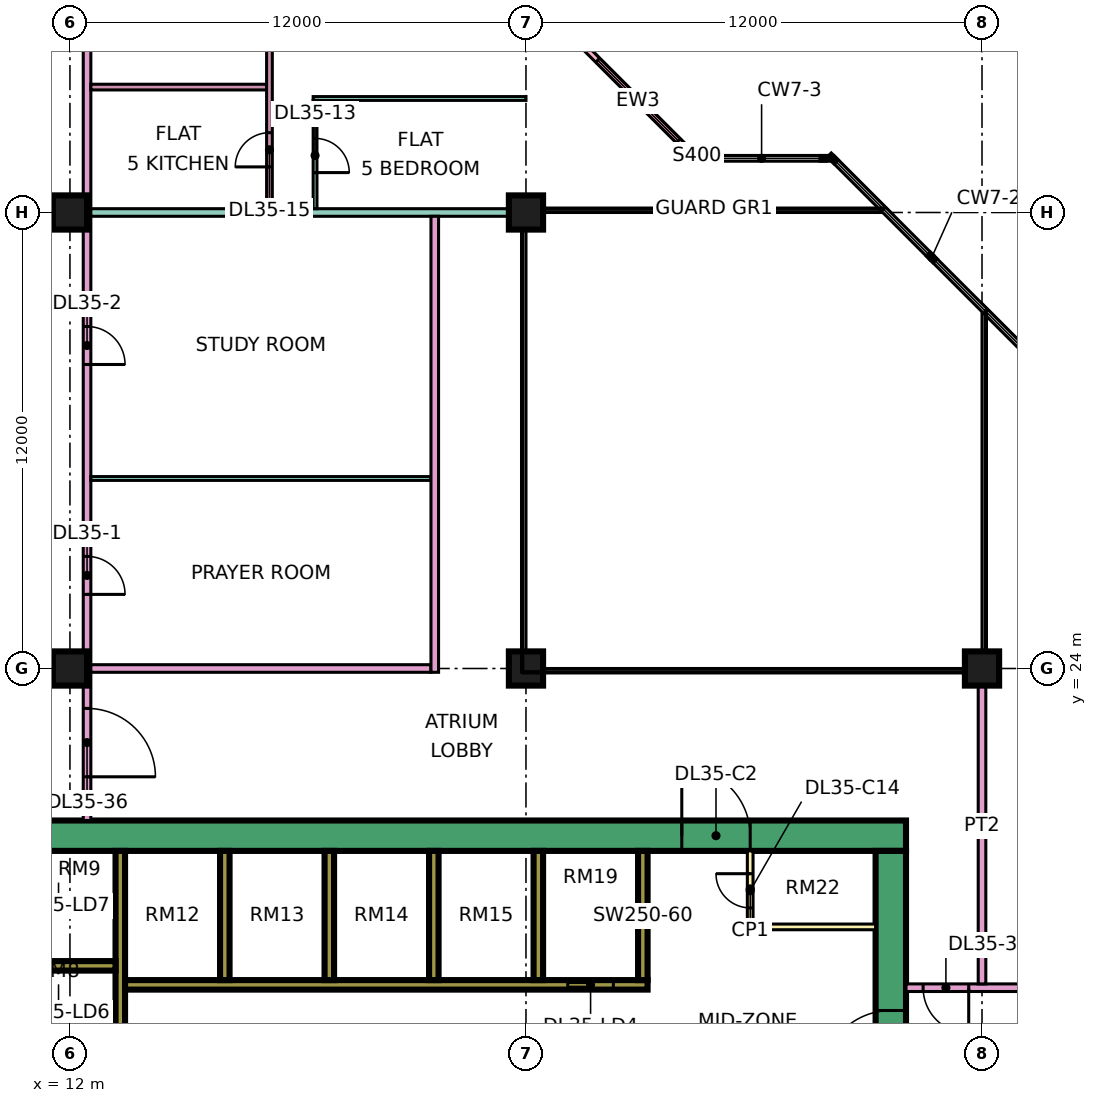
"""IFC4 building model, lengths in metres.
Left out: names, types, materials, properties, quantities, classifications, styles, units other than length and angle.
Written with IfcOpenShell. Run it as: python <this file> out.ifc"""

import sys

from ifc_helpers import new_model, si_unit, direction, frame, frame_2d, origin, origin_2d, place, context, subcontext, project, spatial, rectangle, extrude, element, fill, save


model = new_model("IFC4")
c1 = context("Model", 3, precision=1e-05, world=origin(), true_north=direction((0.0, 1.0)))
c2 = subcontext(c1, "Body", "Model", "MODEL_VIEW")
j1 = project(units=[si_unit("LENGTHUNIT", "METRE"), si_unit("PLANEANGLEUNIT", "RADIAN")], contexts=[c1])
p1 = place(None, origin())
s1 = spatial("IfcSite", under=j1, at=p1, CompositionType="ELEMENT")
p2 = place(p1, origin())
s2 = spatial("IfcBuilding", under=s1, at=p2, CompositionType="ELEMENT")
p3 = place(p2, frame((0.0, 0.0, 157.4)))
s3 = spatial("IfcBuildingStorey", under=s2, at=p3, CompositionType="ELEMENT", Elevation=157.4)
for number, where, z_axis, x_axis in (
    (1, (12.0, 24.0, 0.0), (0.0, 0.0, 1.0), (1.0, 0.0, 0.0)),
    (2, (12.0, 36.0, 0.0), (0.0, 0.0, 1.0), (1.0, 0.0, 0.0)),
    (3, (24.0, 24.0, 0.0), (0.0, 0.0, 1.0), (1.0, 0.0, 0.0)),
    (4, (24.0, 36.0, 0.0), (0.0, 0.0, 1.0), (1.0, 0.0, 0.0)),
    (5, (36.0, 24.0, 0.0), (0.0, 0.0, 1.0), (1.0, 0.0, 0.0)),
):
    element("IfcColumn", number, at=place(p3, frame(where, z_axis=z_axis, x_axis=x_axis)), inside=s3, PredefinedType="COLUMN", context=c2, shape_type="SweptSolid", body=[
        extrude(rectangle(XDim=0.9, YDim=0.9, at=origin_2d()), origin(), (0.0, 0.0, 1.0), 3.75),
    ])
p4 = place(p3, frame((9.0, 19.6, 0.0), z_axis=(0.0, 0.0, 1.0), x_axis=(1.0, 0.0, 0.0)))
e6 = element("IfcWall", 6, at=p4, inside=s3, PredefinedType="SHEAR", context=c2, shape_type="SweptSolid", body=[
    extrude(rectangle(XDim=25.0, YDim=0.8, at=frame_2d((12.5, 0.0))), origin(), (0.0, 0.0, 1.0), 3.75),
])
p5 = place(p4, frame((19.1, 0.0, 0.0)))
e7 = element("IfcOpeningElement", 7, at=p5, cuts=e6, PredefinedType="OPENING", context=c2, shape_type="SweptSolid", body=[
    extrude(rectangle(XDim=1.8, YDim=2.4, at=frame_2d((0.9, 1.2))), frame((0.0, 0.41, 0.0), z_axis=(0.0, -1.0, 0.0), x_axis=(1.0, 0.0, 0.0)), (0.0, 0.0, 1.0), 0.82),
])
p6 = place(p3, frame((33.6, 7.8, 0.0), z_axis=(0.0, 0.0, 1.0), x_axis=(0.0, 1.0, 0.0)))
e8 = element("IfcWall", 8, at=p6, inside=s3, PredefinedType="SHEAR", context=c2, shape_type="SweptSolid", body=[
    extrude(rectangle(XDim=11.4, YDim=0.8, at=frame_2d((5.7, 0.0))), origin(), (0.0, 0.0, 1.0), 3.75),
])
p7 = place(p6, frame((5.4, 0.0, 0.0)))
e9 = element("IfcOpeningElement", 9, at=p7, cuts=e8, PredefinedType="OPENING", context=c2, shape_type="SweptSolid", body=[
    extrude(rectangle(XDim=1.8, YDim=2.4, at=frame_2d((0.9, 1.2))), frame((0.0, 0.41, 0.0), z_axis=(0.0, -1.0, 0.0), x_axis=(1.0, 0.0, 0.0)), (0.0, 0.0, 1.0), 0.82),
])
p8 = place(p3, frame((13.325, 7.8, 0.0), z_axis=(0.0, 0.0, 1.0), x_axis=(0.0, 1.0, 0.0)))
e10 = element("IfcWall", 10, at=p8, inside=s3, PredefinedType="SHEAR", context=c2, shape_type="SweptSolid", body=[
    extrude(rectangle(XDim=11.4, YDim=0.25, at=frame_2d((5.7, 0.0))), origin(), (0.0, 0.0, 1.0), 3.75),
])
p9 = place(p3, frame((13.45, 15.675, 0.0), z_axis=(0.0, 0.0, 1.0), x_axis=(1.0, 0.0, 0.0)))
e11 = element("IfcWall", 11, at=p9, inside=s3, PredefinedType="SHEAR", context=c2, shape_type="SweptSolid", body=[
    extrude(rectangle(XDim=13.75, YDim=0.25, at=frame_2d((6.875, 0.0))), origin(), (0.0, 0.0, 1.0), 3.75),
])
p10 = place(p9, frame((11.65, 0.0, 0.0)))
e12 = element("IfcOpeningElement", 12, at=p10, cuts=e11, PredefinedType="OPENING", context=c2, shape_type="SweptSolid", body=[
    extrude(rectangle(XDim=1.2, YDim=2.2, at=frame_2d((0.6, 1.1))), frame((0.0, 0.135, 0.0), z_axis=(0.0, -1.0, 0.0), x_axis=(1.0, 0.0, 0.0)), (0.0, 0.0, 1.0), 0.27),
])
p11 = place(p3, frame((10.2, 16.175, 0.0), z_axis=(0.0, 0.0, 1.0), x_axis=(1.0, 0.0, 0.0)))
e13 = element("IfcWall", 13, at=p11, inside=s3, PredefinedType="SHEAR", context=c2, shape_type="SweptSolid", body=[
    extrude(rectangle(XDim=3.0, YDim=0.25, at=frame_2d((1.5, 0.0))), origin(), (0.0, 0.0, 1.0), 3.75),
])
for number, where, z_axis, x_axis in (
    (14, (16.075, 15.8, 0.0), (0.0, 0.0, 1.0), (0.0, 1.0, 0.0)),
    (15, (18.825, 15.8, 0.0), (0.0, 0.0, 1.0), (0.0, 1.0, 0.0)),
    (16, (21.575, 15.8, 0.0), (0.0, 0.0, 1.0), (0.0, 1.0, 0.0)),
    (17, (24.325, 15.8, 0.0), (0.0, 0.0, 1.0), (0.0, 1.0, 0.0)),
    (18, (27.075, 15.8, 0.0), (0.0, 0.0, 1.0), (0.0, 1.0, 0.0)),
):
    element("IfcWall", number, at=place(p3, frame(where, z_axis=z_axis, x_axis=x_axis)), inside=s3, PredefinedType="SHEAR", context=c2, shape_type="SweptSolid", body=[
        extrude(rectangle(XDim=3.4, YDim=0.25, at=frame_2d((1.7, 0.0))), origin(), (0.0, 0.0, 1.0), 3.75),
    ])
p12 = place(p3, frame((28.447, 37.447, 0.0), z_axis=(0.0, 0.0, 1.0), x_axis=(-0.707106781187, 0.707106781187, 0.0)))
e19 = element("IfcWall", 19, at=p12, inside=s3, PredefinedType="SOLIDWALL", context=c2, shape_type="SweptSolid", body=[
    extrude(rectangle(XDim=4.243, YDim=0.15, at=frame_2d((2.121, 0.0))), origin(), (0.0, 0.0, 1.0), 3.35),
])
p13 = place(p12, frame((0.621, 0.0, 0.45)))
e20 = element("IfcOpeningElement", 20, at=p13, cuts=e19, PredefinedType="OPENING", context=c2, shape_type="SweptSolid", body=[
    extrude(rectangle(XDim=3.0, YDim=2.4, at=frame_2d((1.5, 1.2))), frame((0.0, 0.085, 0.0), z_axis=(0.0, -1.0, 0.0), x_axis=(1.0, 0.0, 0.0)), (0.0, 0.0, 1.0), 0.17),
])
p14 = place(p3, frame((29.9, 17.2, 0.0), z_axis=(0.0, 0.0, 1.0), x_axis=(0.0, 1.0, 0.0)))
e21 = element("IfcWall", 21, at=p14, inside=s3, PredefinedType="PARTITIONING", context=c2, shape_type="SweptSolid", body=[
    extrude(rectangle(XDim=2.0, YDim=0.15, at=frame_2d((1.0, 0.0))), origin(), (0.0, 0.0, 1.0), 3.35),
])
p15 = place(p14, frame((0.5, 0.0, 0.0)))
e22 = element("IfcOpeningElement", 22, at=p15, cuts=e21, PredefinedType="OPENING", context=c2, shape_type="SweptSolid", body=[
    extrude(rectangle(XDim=0.9, YDim=2.1, at=frame_2d((0.45, 1.05))), frame((0.0, 0.085, 0.0), z_axis=(0.0, -1.0, 0.0), x_axis=(1.0, 0.0, 0.0)), (0.0, 0.0, 1.0), 0.17),
])
p16 = place(p3, frame((29.9, 17.2, 0.0), z_axis=(0.0, 0.0, 1.0), x_axis=(1.0, 0.0, 0.0)))
e23 = element("IfcWall", 23, at=p16, inside=s3, PredefinedType="PARTITIONING", context=c2, shape_type="SweptSolid", body=[
    extrude(rectangle(XDim=3.3, YDim=0.15, at=frame_2d((1.65, 0.0))), origin(), (0.0, 0.0, 1.0), 3.35),
])
p17 = place(p3, frame((12.45, 20.0, 0.0), z_axis=(0.0, 0.0, 1.0), x_axis=(0.0, 1.0, 0.0)))
e24 = element("IfcWall", 24, at=p17, inside=s3, PredefinedType="PARTITIONING", context=c2, shape_type="SweptSolid", body=[
    extrude(rectangle(XDim=43.0, YDim=0.2, at=frame_2d((21.5, 0.0))), origin(), (0.0, 0.0, 1.0), 3.35),
])
p18 = place(p17, frame((5.95, 0.0, 0.0)))
e25 = element("IfcOpeningElement", 25, at=p18, cuts=e24, PredefinedType="OPENING", context=c2, shape_type="SweptSolid", body=[
    extrude(rectangle(XDim=1.0, YDim=2.1, at=frame_2d((0.5, 1.05))), frame((0.0, 0.11, 0.0), z_axis=(0.0, -1.0, 0.0), x_axis=(1.0, 0.0, 0.0)), (0.0, 0.0, 1.0), 0.22),
])
p19 = place(p17, frame((12.0, 0.0, 0.0)))
e26 = element("IfcOpeningElement", 26, at=p19, cuts=e24, PredefinedType="OPENING", context=c2, shape_type="SweptSolid", body=[
    extrude(rectangle(XDim=1.0, YDim=2.1, at=frame_2d((0.5, 1.05))), frame((0.0, 0.11, 0.0), z_axis=(0.0, -1.0, 0.0), x_axis=(1.0, 0.0, 0.0)), (0.0, 0.0, 1.0), 0.22),
])
p20 = place(p17, frame((23.35, 0.0, 0.0)))
e27 = element("IfcOpeningElement", 27, at=p20, cuts=e24, PredefinedType="OPENING", context=c2, shape_type="SweptSolid", body=[
    extrude(rectangle(XDim=1.0, YDim=2.1, at=frame_2d((0.5, 1.05))), frame((0.0, 0.11, 0.0), z_axis=(0.0, -1.0, 0.0), x_axis=(1.0, 0.0, 0.0)), (0.0, 0.0, 1.0), 0.22),
])
p21 = place(p17, frame((35.2, 0.0, 0.0)))
e28 = element("IfcOpeningElement", 28, at=p21, cuts=e24, PredefinedType="OPENING", context=c2, shape_type="SweptSolid", body=[
    extrude(rectangle(XDim=1.0, YDim=2.1, at=frame_2d((0.5, 1.05))), frame((0.0, 0.11, 0.0), z_axis=(0.0, -1.0, 0.0), x_axis=(1.0, 0.0, 0.0)), (0.0, 0.0, 1.0), 0.22),
])
p22 = place(p17, frame((1.15, 0.0, 0.0)))
e29 = element("IfcOpeningElement", 29, at=p22, cuts=e24, PredefinedType="OPENING", context=c2, shape_type="SweptSolid", body=[
    extrude(rectangle(XDim=1.8, YDim=2.1, at=frame_2d((0.9, 1.05))), frame((0.0, 0.11, 0.0), z_axis=(0.0, -1.0, 0.0), x_axis=(1.0, 0.0, 0.0)), (0.0, 0.0, 1.0), 0.22),
])
p23 = place(p17, frame((28.6, 0.0, 0.0)))
e30 = element("IfcOpeningElement", 30, at=p23, cuts=e24, PredefinedType="OPENING", context=c2, shape_type="SweptSolid", body=[
    extrude(rectangle(XDim=1.8, YDim=2.1, at=frame_2d((0.9, 1.05))), frame((0.0, 0.11, 0.0), z_axis=(0.0, -1.0, 0.0), x_axis=(1.0, 0.0, 0.0)), (0.0, 0.0, 1.0), 0.22),
])
p24 = place(p3, frame((12.55, 24.0, 0.0), z_axis=(0.0, 0.0, 1.0), x_axis=(1.0, 0.0, 0.0)))
e31 = element("IfcWall", 31, at=p24, inside=s3, PredefinedType="PARTITIONING", context=c2, shape_type="SweptSolid", body=[
    extrude(rectangle(XDim=8.95, YDim=0.2, at=frame_2d((4.475, 0.0))), origin(), (0.0, 0.0, 1.0), 3.35),
])
p25 = place(p3, frame((12.55, 29.0, 0.0), z_axis=(0.0, 0.0, 1.0), x_axis=(1.0, 0.0, 0.0)))
e32 = element("IfcWall", 32, at=p25, inside=s3, PredefinedType="PARTITIONING", context=c2, shape_type="SweptSolid", body=[
    extrude(rectangle(XDim=8.95, YDim=0.1, at=frame_2d((4.475, 0.0))), origin(), (0.0, 0.0, 1.0), 3.35),
])
p26 = place(p3, frame((12.55, 36.0, 0.0), z_axis=(0.0, 0.0, 1.0), x_axis=(1.0, 0.0, 0.0)))
e33 = element("IfcWall", 33, at=p26, inside=s3, PredefinedType="PARTITIONING", context=c2, shape_type="SweptSolid", body=[
    extrude(rectangle(XDim=11.45, YDim=0.2, at=frame_2d((5.725, 0.0))), origin(), (0.0, 0.0, 1.0), 3.35),
])
p27 = place(p3, frame((12.55, 39.3, 0.0), z_axis=(0.0, 0.0, 1.0), x_axis=(1.0, 0.0, 0.0)))
e34 = element("IfcWall", 34, at=p27, inside=s3, PredefinedType="PARTITIONING", context=c2, shape_type="SweptSolid", body=[
    extrude(rectangle(XDim=4.625, YDim=0.15, at=frame_2d((2.312, 0.0))), origin(), (0.0, 0.0, 1.0), 3.35),
])
p28 = place(p3, frame((17.25, 36.1, 0.0), z_axis=(0.0, 0.0, 1.0), x_axis=(0.0, 1.0, 0.0)))
e35 = element("IfcWall", 35, at=p28, inside=s3, PredefinedType="PARTITIONING", context=c2, shape_type="SweptSolid", body=[
    extrude(rectangle(XDim=6.575, YDim=0.15, at=frame_2d((3.288, 0.0))), origin(), (0.0, 0.0, 1.0), 3.35),
])
p29 = place(p28, frame((1.1, 0.0, 0.0)))
e36 = element("IfcOpeningElement", 36, at=p29, cuts=e35, PredefinedType="OPENING", context=c2, shape_type="SweptSolid", body=[
    extrude(rectangle(XDim=0.9, YDim=2.1, at=frame_2d((0.45, 1.05))), frame((0.0, 0.085, 0.0), z_axis=(0.0, -1.0, 0.0), x_axis=(1.0, 0.0, 0.0)), (0.0, 0.0, 1.0), 0.17),
])
p30 = place(p3, frame((18.4, 39.0, 0.0), z_axis=(0.0, 0.0, 1.0), x_axis=(1.0, 0.0, 0.0)))
e37 = element("IfcWall", 37, at=p30, inside=s3, PredefinedType="PARTITIONING", context=c2, shape_type="SweptSolid", body=[
    extrude(rectangle(XDim=5.6, YDim=0.1, at=frame_2d((2.8, 0.0))), origin(), (0.0, 0.0, 1.0), 3.35),
])
p31 = place(p3, frame((18.45, 36.1, 0.0), z_axis=(0.0, 0.0, 1.0), x_axis=(0.0, 1.0, 0.0)))
e38 = element("IfcWall", 38, at=p31, inside=s3, PredefinedType="PARTITIONING", context=c2, shape_type="SweptSolid", body=[
    extrude(rectangle(XDim=2.85, YDim=0.1, at=frame_2d((1.425, 0.0))), origin(), (0.0, 0.0, 1.0), 3.35),
])
p32 = place(p31, frame((0.95, 0.0, 0.0)))
e39 = element("IfcOpeningElement", 39, at=p32, cuts=e38, PredefinedType="OPENING", context=c2, shape_type="SweptSolid", body=[
    extrude(rectangle(XDim=0.9, YDim=2.1, at=frame_2d((0.45, 1.05))), frame((0.0, 0.06, 0.0), z_axis=(0.0, -1.0, 0.0), x_axis=(1.0, 0.0, 0.0)), (0.0, 0.0, 1.0), 0.12),
])
p33 = place(p3, frame((21.6, 23.9, 0.0), z_axis=(0.0, 0.0, 1.0), x_axis=(0.0, 1.0, 0.0)))
e40 = element("IfcWall", 40, at=p33, inside=s3, PredefinedType="PARTITIONING", context=c2, shape_type="SweptSolid", body=[
    extrude(rectangle(XDim=12.0, YDim=0.2, at=frame_2d((6.0, 0.0))), origin(), (0.0, 0.0, 1.0), 3.35),
])
p34 = place(p3, frame((34.0, 15.6, 0.0), z_axis=(0.0, 0.0, 1.0), x_axis=(1.0, 0.0, 0.0)))
e41 = element("IfcWall", 41, at=p34, inside=s3, PredefinedType="PARTITIONING", context=c2, shape_type="SweptSolid", body=[
    extrude(rectangle(XDim=10.35, YDim=0.2, at=frame_2d((5.175, 0.0))), origin(), (0.0, 0.0, 1.0), 3.35),
])
p35 = place(p34, frame((5.6, 0.0, 0.0)))
e42 = element("IfcOpeningElement", 42, at=p35, cuts=e41, PredefinedType="OPENING", context=c2, shape_type="SweptSolid", body=[
    extrude(rectangle(XDim=1.0, YDim=2.1, at=frame_2d((0.5, 1.05))), frame((0.0, 0.11, 0.0), z_axis=(0.0, -1.0, 0.0), x_axis=(1.0, 0.0, 0.0)), (0.0, 0.0, 1.0), 0.22),
])
p36 = place(p34, frame((0.45, 0.0, 0.0)))
e43 = element("IfcOpeningElement", 43, at=p36, cuts=e41, PredefinedType="OPENING", context=c2, shape_type="SweptSolid", body=[
    extrude(rectangle(XDim=1.2, YDim=2.1, at=frame_2d((0.6, 1.05))), frame((0.0, 0.11, 0.0), z_axis=(0.0, -1.0, 0.0), x_axis=(1.0, 0.0, 0.0)), (0.0, 0.0, 1.0), 0.22),
])
p37 = place(p3, frame((36.0, 15.7, 0.0), z_axis=(0.0, 0.0, 1.0), x_axis=(0.0, 1.0, 0.0)))
e44 = element("IfcWall", 44, at=p37, inside=s3, PredefinedType="PARTITIONING", context=c2, shape_type="SweptSolid", body=[
    extrude(rectangle(XDim=8.3, YDim=0.2, at=frame_2d((4.15, 0.0))), origin(), (0.0, 0.0, 1.0), 3.35),
])
p38 = place(p13, origin())
e45 = element("IfcWindow", 45, at=p38, inside=s3, PartitioningType="SINGLE_PANEL", PredefinedType="WINDOW", context=c2, shape_type="SweptSolid", body=[
    extrude(rectangle(XDim=3.0, YDim=2.4, at=frame_2d((1.5, 1.2))), frame((0.0, 0.03, 0.0), z_axis=(0.0, -1.0, 0.0), x_axis=(1.0, 0.0, 0.0)), (0.0, 0.0, 1.0), 0.06),
])
fill(e20, e45)
p39 = place(p10, origin())
e46 = element("IfcDoor", 46, at=p39, inside=s3, OperationType="DOUBLE_DOOR_SLIDING", PredefinedType="DOOR", context=c2, shape_type="SweptSolid", body=[
    extrude(rectangle(XDim=1.2, YDim=2.2, at=frame_2d((0.6, 1.1))), frame((0.0, 0.025, 0.0), z_axis=(0.0, -1.0, 0.0), x_axis=(1.0, 0.0, 0.0)), (0.0, 0.0, 1.0), 0.05),
])
fill(e12, e46)
p40 = place(p7, origin())
e47 = element("IfcDoor", 47, at=p40, inside=s3, OperationType="DOUBLE_DOOR_SINGLE_SWING", PredefinedType="DOOR", context=c2, shape_type="SweptSolid", body=[
    extrude(rectangle(XDim=1.8, YDim=2.4, at=frame_2d((0.9, 1.2))), frame((0.0, 0.025, 0.0), z_axis=(0.0, -1.0, 0.0), x_axis=(1.0, 0.0, 0.0)), (0.0, 0.0, 1.0), 0.05),
])
fill(e9, e47)
p41 = place(p5, origin())
e48 = element("IfcDoor", 48, at=p41, inside=s3, OperationType="DOUBLE_DOOR_SINGLE_SWING", PredefinedType="DOOR", context=c2, shape_type="SweptSolid", body=[
    extrude(rectangle(XDim=1.8, YDim=2.4, at=frame_2d((0.9, 1.2))), frame((0.0, 0.025, 0.0), z_axis=(0.0, -1.0, 0.0), x_axis=(1.0, 0.0, 0.0)), (0.0, 0.0, 1.0), 0.05),
])
fill(e7, e48)
p42 = place(p15, frame((0.9, 0.0, 0.0), z_axis=(0.0, 0.0, 1.0), x_axis=(-1.0, 0.0, 0.0)))
e49 = element("IfcDoor", 49, at=p42, inside=s3, OperationType="SINGLE_SWING_RIGHT", PredefinedType="DOOR", context=c2, shape_type="SweptSolid", body=[
    extrude(rectangle(XDim=0.9, YDim=2.1, at=frame_2d((0.45, 1.05))), frame((0.0, 0.025, 0.0), z_axis=(0.0, -1.0, 0.0), x_axis=(1.0, 0.0, 0.0)), (0.0, 0.0, 1.0), 0.05),
])
fill(e22, e49)
p43 = place(p18, frame((1.0, 0.0, 0.0), z_axis=(0.0, 0.0, 1.0), x_axis=(-1.0, 0.0, 0.0)))
e50 = element("IfcDoor", 50, at=p43, inside=s3, OperationType="SINGLE_SWING_LEFT", PredefinedType="DOOR", context=c2, shape_type="SweptSolid", body=[
    extrude(rectangle(XDim=1.0, YDim=2.1, at=frame_2d((0.5, 1.05))), frame((0.0, 0.025, 0.0), z_axis=(0.0, -1.0, 0.0), x_axis=(1.0, 0.0, 0.0)), (0.0, 0.0, 1.0), 0.05),
])
fill(e25, e50)
p44 = place(p19, frame((1.0, 0.0, 0.0), z_axis=(0.0, 0.0, 1.0), x_axis=(-1.0, 0.0, 0.0)))
e51 = element("IfcDoor", 51, at=p44, inside=s3, OperationType="SINGLE_SWING_LEFT", PredefinedType="DOOR", context=c2, shape_type="SweptSolid", body=[
    extrude(rectangle(XDim=1.0, YDim=2.1, at=frame_2d((0.5, 1.05))), frame((0.0, 0.025, 0.0), z_axis=(0.0, -1.0, 0.0), x_axis=(1.0, 0.0, 0.0)), (0.0, 0.0, 1.0), 0.05),
])
fill(e26, e51)
p45 = place(p32, frame((0.9, 0.0, 0.0), z_axis=(0.0, 0.0, 1.0), x_axis=(-1.0, 0.0, 0.0)))
e52 = element("IfcDoor", 52, at=p45, inside=s3, OperationType="SINGLE_SWING_LEFT", PredefinedType="DOOR", context=c2, shape_type="SweptSolid", body=[
    extrude(rectangle(XDim=0.9, YDim=2.1, at=frame_2d((0.45, 1.05))), frame((0.0, 0.025, 0.0), z_axis=(0.0, -1.0, 0.0), x_axis=(1.0, 0.0, 0.0)), (0.0, 0.0, 1.0), 0.05),
])
fill(e39, e52)
p46 = place(p29, origin())
e53 = element("IfcDoor", 53, at=p46, inside=s3, OperationType="SINGLE_SWING_LEFT", PredefinedType="DOOR", context=c2, shape_type="SweptSolid", body=[
    extrude(rectangle(XDim=0.9, YDim=2.1, at=frame_2d((0.45, 1.05))), frame((0.0, 0.025, 0.0), z_axis=(0.0, -1.0, 0.0), x_axis=(1.0, 0.0, 0.0)), (0.0, 0.0, 1.0), 0.05),
])
fill(e36, e53)
p47 = place(p36, origin())
e54 = element("IfcDoor", 54, at=p47, inside=s3, OperationType="SINGLE_SWING_RIGHT", PredefinedType="DOOR", context=c2, shape_type="SweptSolid", body=[
    extrude(rectangle(XDim=1.2, YDim=2.1, at=frame_2d((0.6, 1.05))), frame((0.0, 0.025, 0.0), z_axis=(0.0, -1.0, 0.0), x_axis=(1.0, 0.0, 0.0)), (0.0, 0.0, 1.0), 0.05),
])
fill(e43, e54)
p48 = place(p22, frame((1.8, 0.0, 0.0), z_axis=(0.0, 0.0, 1.0), x_axis=(-1.0, 0.0, 0.0)))
e55 = element("IfcDoor", 55, at=p48, inside=s3, OperationType="DOUBLE_DOOR_SINGLE_SWING", PredefinedType="DOOR", context=c2, shape_type="SweptSolid", body=[
    extrude(rectangle(XDim=1.8, YDim=2.1, at=frame_2d((0.9, 1.05))), frame((0.0, 0.025, 0.0), z_axis=(0.0, -1.0, 0.0), x_axis=(1.0, 0.0, 0.0)), (0.0, 0.0, 1.0), 0.05),
])
fill(e29, e55)
save(model, sys.argv[1])
